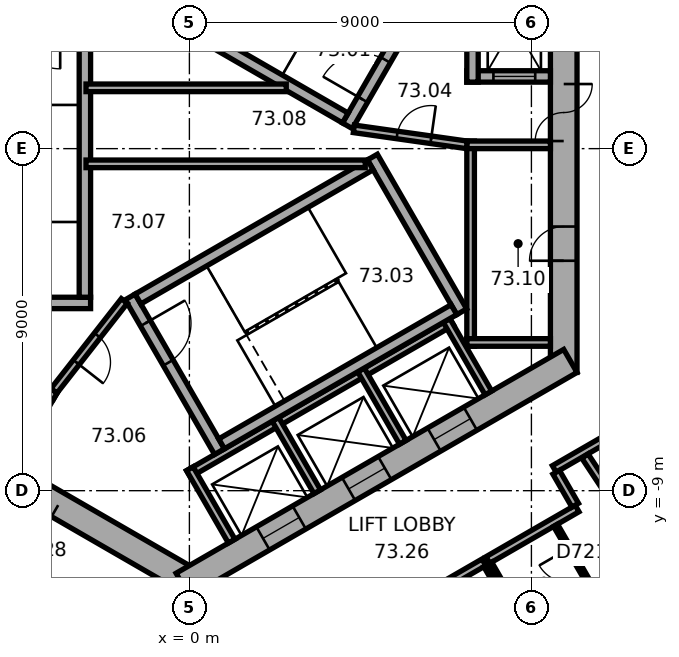
"""IFC4 building model, lengths in metres.
Left out: names, types, materials, properties, quantities, classifications, styles, units other than length and angle.
Written with IfcOpenShell. Run it as: python <this file> out.ifc"""

import sys

from ifc_helpers import new_model, si_unit, direction, frame, frame_2d, origin, place, context, subcontext, project, spatial, rectangle, extrude, element, fill, save


model = new_model("IFC4")
c1 = context("Model", 3, precision=1e-05, world=origin(), true_north=direction((0.0, 1.0)))
c2 = subcontext(c1, "Body", "Model", "MODEL_VIEW")
j1 = project(units=[si_unit("LENGTHUNIT", "METRE"), si_unit("PLANEANGLEUNIT", "RADIAN")], contexts=[c1])
p1 = place(None, origin())
s1 = spatial("IfcSite", under=j1, at=p1, CompositionType="ELEMENT")
p2 = place(p1, origin())
s2 = spatial("IfcBuilding", under=s1, at=p2, CompositionType="ELEMENT")
p3 = place(p2, frame((0.0, 0.0, 296.8)))
s3 = spatial("IfcBuildingStorey", under=s2, at=p3, CompositionType="ELEMENT", Elevation=296.8)
p4 = place(p3, frame((9.85, -5.889, 0.0), z_axis=(0.0, 0.0, 1.0), x_axis=(0.0, 1.0, 0.0)))
e1 = element("IfcWall", 1, at=p4, inside=s3, PredefinedType="SHEAR", context=c2, shape_type="SweptSolid", body=[
    extrude(rectangle(XDim=11.778, YDim=0.7, at=frame_2d((5.889, 0.0))), origin(), (0.0, 0.0, 1.0), 3.7),
])
p5 = place(p4, frame((6.089, 0.0, 0.0)))
e2 = element("IfcOpeningElement", 2, at=p5, cuts=e1, PredefinedType="OPENING", context=c2, shape_type="SweptSolid", body=[
    extrude(rectangle(XDim=1.5, YDim=2.1, at=frame_2d((0.75, 1.05))), frame((0.0, 0.36, 0.0), z_axis=(0.0, -1.0, 0.0), x_axis=(1.0, 0.0, 0.0)), (0.0, 0.0, 1.0), 0.72),
])
p6 = place(p4, frame((2.939, 0.0, 0.0)))
e3 = element("IfcOpeningElement", 3, at=p6, cuts=e1, PredefinedType="OPENING", context=c2, shape_type="SweptSolid", body=[
    extrude(rectangle(XDim=0.9, YDim=2.1, at=frame_2d((0.45, 1.05))), frame((0.0, 0.36, 0.0), z_axis=(0.0, -1.0, 0.0), x_axis=(1.0, 0.0, 0.0)), (0.0, 0.0, 1.0), 0.72),
])
p7 = place(p3, frame((-10.025, -5.586, 0.0), z_axis=(0.0, 0.0, 1.0), x_axis=(0.866026453023, -0.499998182661, 0.0)))
e4 = element("IfcWall", 4, at=p7, inside=s3, PredefinedType="SHEAR", context=c2, shape_type="SweptSolid", body=[
    extrude(rectangle(XDim=11.778, YDim=0.7, at=frame_2d((5.889, 0.0))), origin(), (0.0, 0.0, 1.0), 3.7),
])
p8 = place(p7, frame((6.089, 0.0, 0.0)))
e5 = element("IfcOpeningElement", 5, at=p8, cuts=e4, PredefinedType="OPENING", context=c2, shape_type="SweptSolid", body=[
    extrude(rectangle(XDim=1.5, YDim=2.1, at=frame_2d((0.75, 1.05))), frame((0.0, 0.36, 0.0), z_axis=(0.0, -1.0, 0.0), x_axis=(1.0, 0.0, 0.0)), (0.0, 0.0, 1.0), 0.72),
])
p9 = place(p7, frame((1.539, 0.0, 0.0)))
e6 = element("IfcOpeningElement", 6, at=p9, cuts=e4, PredefinedType="OPENING", context=c2, shape_type="SweptSolid", body=[
    extrude(rectangle(XDim=1.1, YDim=2.1, at=frame_2d((0.55, 1.05))), frame((0.0, 0.36, 0.0), z_axis=(0.0, -1.0, 0.0), x_axis=(1.0, 0.0, 0.0)), (0.0, 0.0, 1.0), 0.72),
])
p10 = place(p7, frame((4.139, 0.0, 0.0)))
e7 = element("IfcOpeningElement", 7, at=p10, cuts=e4, PredefinedType="OPENING", context=c2, shape_type="SweptSolid", body=[
    extrude(rectangle(XDim=1.1, YDim=2.1, at=frame_2d((0.55, 1.05))), frame((0.0, 0.36, 0.0), z_axis=(0.0, -1.0, 0.0), x_axis=(1.0, 0.0, 0.0)), (0.0, 0.0, 1.0), 0.72),
])
p11 = place(p3, frame((-0.175, -11.475, 0.0), z_axis=(0.0, 0.0, 1.0), x_axis=(0.866026453023, 0.499998182661, 0.0)))
e8 = element("IfcWall", 8, at=p11, inside=s3, PredefinedType="SHEAR", context=c2, shape_type="SweptSolid", body=[
    extrude(rectangle(XDim=11.778, YDim=0.7, at=frame_2d((5.889, 0.0))), origin(), (0.0, 0.0, 1.0), 3.7),
])
p12 = place(p11, frame((2.439, 0.0, 0.0)))
e9 = element("IfcOpeningElement", 9, at=p12, cuts=e8, PredefinedType="OPENING", context=c2, shape_type="SweptSolid", body=[
    extrude(rectangle(XDim=1.1, YDim=2.1, at=frame_2d((0.55, 1.05))), frame((0.0, 0.36, 0.0), z_axis=(0.0, -1.0, 0.0), x_axis=(1.0, 0.0, 0.0)), (0.0, 0.0, 1.0), 0.72),
])
p13 = place(p11, frame((5.039, 0.0, 0.0)))
e10 = element("IfcOpeningElement", 10, at=p13, cuts=e8, PredefinedType="OPENING", context=c2, shape_type="SweptSolid", body=[
    extrude(rectangle(XDim=1.1, YDim=2.1, at=frame_2d((0.55, 1.05))), frame((0.0, 0.36, 0.0), z_axis=(0.0, -1.0, 0.0), x_axis=(1.0, 0.0, 0.0)), (0.0, 0.0, 1.0), 0.72),
])
p14 = place(p11, frame((7.639, 0.0, 0.0)))
e11 = element("IfcOpeningElement", 11, at=p14, cuts=e8, PredefinedType="OPENING", context=c2, shape_type="SweptSolid", body=[
    extrude(rectangle(XDim=1.1, YDim=2.1, at=frame_2d((0.55, 1.05))), frame((0.0, 0.36, 0.0), z_axis=(0.0, -1.0, 0.0), x_axis=(1.0, 0.0, 0.0)), (0.0, 0.0, 1.0), 0.72),
])
p15 = place(p3, frame((7.4, -5.2, 0.0), z_axis=(0.0, 0.0, 1.0), x_axis=(0.0, 1.0, 0.0)))
e12 = element("IfcWall", 12, at=p15, inside=s3, PredefinedType="PARTITIONING", context=c2, shape_type="SweptSolid", body=[
    extrude(rectangle(XDim=5.4, YDim=0.2, at=frame_2d((2.7, 0.0))), origin(), (0.0, 0.0, 1.0), 3.35),
])
for number, where, z_axis, x_axis in (
    (13, (7.3, -5.1, 0.0), (0.0, 0.0, 1.0), (1.0, 0.0, 0.0)),
    (14, (7.3, 0.1, 0.0), (0.0, 0.0, 1.0), (1.0, 0.0, 0.0)),
):
    element("IfcWall", number, at=place(p3, frame(where, z_axis=z_axis, x_axis=x_axis)), inside=s3, PredefinedType="PARTITIONING", context=c2, shape_type="SweptSolid", body=[
        extrude(rectangle(XDim=2.2, YDim=0.2, at=frame_2d((1.1, 0.0))), origin(), (0.0, 0.0, 1.0), 3.35),
    ])
p16 = place(p3, frame((-8.203, -3.809, 0.0), z_axis=(0.0, 0.0, 1.0), x_axis=(0.866028230842, -0.499995103361, 0.0)))
e15 = element("IfcWall", 15, at=p16, inside=s3, PredefinedType="PARTITIONING", context=c2, shape_type="SweptSolid", body=[
    extrude(rectangle(XDim=5.4, YDim=0.2, at=frame_2d((2.7, 0.0))), origin(), (0.0, 0.0, 1.0), 3.35),
])
p17 = place(p3, frame((-3.563, -6.372, 0.0), z_axis=(0.0, 0.0, 1.0), x_axis=(-0.499994660107, -0.866028486751, 0.0)))
e16 = element("IfcWall", 16, at=p17, inside=s3, PredefinedType="PARTITIONING", context=c2, shape_type="SweptSolid", body=[
    extrude(rectangle(XDim=2.2, YDim=0.2, at=frame_2d((1.1, 0.0))), origin(), (0.0, 0.0, 1.0), 3.35),
])
p18 = place(p3, frame((-0.024, -8.559, 0.0), z_axis=(0.0, 0.0, 1.0), x_axis=(0.866026010844, 0.49999894854, 0.0)))
e17 = element("IfcWall", 17, at=p18, inside=s3, PredefinedType="PARTITIONING", context=c2, shape_type="SweptSolid", body=[
    extrude(rectangle(XDim=8.0, YDim=0.2, at=frame_2d((4.0, 0.0))), origin(), (0.0, 0.0, 1.0), 3.35),
])
for number, where, z_axis, x_axis in (
    (18, (0.013, -8.422, 0.0), (0.0, 0.0, 1.0), (0.5, -0.866, 0.0)),
    (19, (2.264, -7.122, 0.0), (0.0, 0.0, 1.0), (0.5, -0.866, 0.0)),
    (20, (4.516, -5.822, 0.0), (0.0, 0.0, 1.0), (0.5, -0.866, 0.0)),
    (21, (6.768, -4.522, 0.0), (0.0, 0.0, 1.0), (0.5, -0.866, 0.0)),
):
    element("IfcWall", number, at=place(p3, frame(where, z_axis=z_axis, x_axis=x_axis)), inside=s3, PredefinedType="PARTITIONING", context=c2, shape_type="SweptSolid", body=[
        extrude(rectangle(XDim=2.2, YDim=0.2, at=frame_2d((1.1, 0.0))), origin(), (0.0, 0.0, 1.0), 3.35),
    ])
p19 = place(p3, frame((4.158, 0.602, 0.0), z_axis=(0.0, 0.0, 1.0), x_axis=(0.499977259774, 0.866038532462, 0.0)))
e22 = element("IfcWall", 22, at=p19, inside=s3, PredefinedType="SHEAR", context=c2, shape_type="SweptSolid", body=[
    extrude(rectangle(XDim=4.7, YDim=0.3, at=frame_2d((2.35, 0.0))), origin(), (0.0, 0.0, 1.0), 3.35),
])
p20 = place(p19, frame((0.8, 0.0, 0.0)))
e23 = element("IfcOpeningElement", 23, at=p20, cuts=e22, PredefinedType="OPENING", context=c2, shape_type="SweptSolid", body=[
    extrude(rectangle(XDim=1.2, YDim=2.1, at=frame_2d((0.6, 1.05))), frame((0.0, 0.16, 0.0), z_axis=(0.0, -1.0, 0.0), x_axis=(1.0, 0.0, 0.0)), (0.0, 0.0, 1.0), 0.32),
])
p21 = place(p3, frame((4.103, 0.807, 0.0), z_axis=(0.0, 0.0, 1.0), x_axis=(-0.866027801685, 0.499995846692, 0.0)))
e24 = element("IfcWall", 24, at=p21, inside=s3, PredefinedType="SHEAR", context=c2, shape_type="SweptSolid", body=[
    extrude(rectangle(XDim=7.06, YDim=0.3, at=frame_2d((3.53, 0.0))), origin(), (0.0, 0.0, 1.0), 3.35),
])
p22 = place(p3, frame((-2.6, -4.06, 0.0), z_axis=(0.0, 0.0, 1.0), x_axis=(-1.0, 0.0, 0.0)))
e25 = element("IfcWall", 25, at=p22, inside=s3, PredefinedType="SHEAR", context=c2, shape_type="SweptSolid", body=[
    extrude(rectangle(XDim=4.7, YDim=0.3, at=frame_2d((2.35, 0.0))), origin(), (0.0, 0.0, 1.0), 3.35),
])
p23 = place(p3, frame((-2.75, 3.15, 0.0), z_axis=(0.0, 0.0, 1.0), x_axis=(0.0, -1.0, 0.0)))
e26 = element("IfcWall", 26, at=p23, inside=s3, PredefinedType="SHEAR", context=c2, shape_type="SweptSolid", body=[
    extrude(rectangle(XDim=7.06, YDim=0.3, at=frame_2d((3.53, 0.0))), origin(), (0.0, 0.0, 1.0), 3.35),
])
p24 = place(p3, frame((-1.558, -3.902, 0.0), z_axis=(0.0, 0.0, 1.0), x_axis=(0.499977259774, -0.866038532462, 0.0)))
e27 = element("IfcWall", 27, at=p24, inside=s3, PredefinedType="SHEAR", context=c2, shape_type="SweptSolid", body=[
    extrude(rectangle(XDim=4.7, YDim=0.3, at=frame_2d((2.35, 0.0))), origin(), (0.0, 0.0, 1.0), 3.35),
])
p25 = place(p24, frame((0.8, 0.0, 0.0)))
e28 = element("IfcOpeningElement", 28, at=p25, cuts=e27, PredefinedType="OPENING", context=c2, shape_type="SweptSolid", body=[
    extrude(rectangle(XDim=1.2, YDim=2.1, at=frame_2d((0.6, 1.05))), frame((0.0, 0.16, 0.0), z_axis=(0.0, -1.0, 0.0), x_axis=(1.0, 0.0, 0.0)), (0.0, 0.0, 1.0), 0.32),
])
p26 = place(p3, frame((4.816, -0.222, 0.0), z_axis=(0.0, 0.0, 1.0), x_axis=(0.499977259774, -0.866038532462, 0.0)))
e29 = element("IfcWall", 29, at=p26, inside=s3, PredefinedType="SHEAR", context=c2, shape_type="SweptSolid", body=[
    extrude(rectangle(XDim=4.7, YDim=0.3, at=frame_2d((2.35, 0.0))), origin(), (0.0, 0.0, 1.0), 3.35),
])
for number, where, z_axis, x_axis in (
    (30, (-1.353, -3.957, 0.0), (0.0, 0.0, 1.0), (0.866, 0.5, 0.0)),
    (31, (0.847, -7.767, 0.0), (0.0, 0.0, 1.0), (0.866, 0.5, 0.0)),
):
    element("IfcWall", number, at=place(p3, frame(where, z_axis=z_axis, x_axis=x_axis)), inside=s3, PredefinedType="SHEAR", context=c2, shape_type="SweptSolid", body=[
        extrude(rectangle(XDim=7.06, YDim=0.3, at=frame_2d((3.53, 0.0))), origin(), (0.0, 0.0, 1.0), 3.35),
    ])
p27 = place(p3, frame((7.3, 1.9, 0.0), z_axis=(0.0, 0.0, 1.0), x_axis=(1.0, 0.0, 0.0)))
e32 = element("IfcWall", 32, at=p27, inside=s3, PredefinedType="SHEAR", context=c2, shape_type="SweptSolid", body=[
    extrude(rectangle(XDim=2.2, YDim=0.3, at=frame_2d((1.1, 0.0))), origin(), (0.0, 0.0, 1.0), 3.35),
])
p28 = place(p27, frame((0.7, 0.0, 0.0)))
e33 = element("IfcOpeningElement", 33, at=p28, cuts=e32, PredefinedType="OPENING", context=c2, shape_type="SweptSolid", body=[
    extrude(rectangle(XDim=1.1, YDim=2.1, at=frame_2d((0.55, 1.05))), frame((0.0, 0.16, 0.0), z_axis=(0.0, -1.0, 0.0), x_axis=(1.0, 0.0, 0.0)), (0.0, 0.0, 1.0), 0.32),
])
p29 = place(p3, frame((7.45, 1.75, 0.0), z_axis=(0.0, 0.0, 1.0), x_axis=(0.0, 1.0, 0.0)))
e34 = element("IfcWall", 34, at=p29, inside=s3, PredefinedType="SHEAR", context=c2, shape_type="SweptSolid", body=[
    extrude(rectangle(XDim=3.35, YDim=0.3, at=frame_2d((1.675, 0.0))), origin(), (0.0, 0.0, 1.0), 3.35),
])
p30 = place(p3, frame((4.327, 0.521, 0.0), z_axis=(0.0, 0.0, 1.0), x_axis=(0.990124376366, -0.14019172346, 0.0)))
e35 = element("IfcWall", 35, at=p30, inside=s3, PredefinedType="PARTITIONING", context=c2, shape_type="SweptSolid", body=[
    extrude(rectangle(XDim=3.002, YDim=0.2, at=frame_2d((1.501, 0.0))), origin(), (0.0, 0.0, 1.0), 3.35),
])
p31 = place(p30, frame((1.15, 0.0, 0.0)))
e36 = element("IfcOpeningElement", 36, at=p31, cuts=e35, PredefinedType="OPENING", context=c2, shape_type="SweptSolid", body=[
    extrude(rectangle(XDim=0.9, YDim=2.1, at=frame_2d((0.45, 1.05))), frame((0.0, 0.11, 0.0), z_axis=(0.0, -1.0, 0.0), x_axis=(1.0, 0.0, 0.0)), (0.0, 0.0, 1.0), 0.22),
])
p32 = place(p3, frame((-1.712, -4.008, 0.0), z_axis=(0.0, 0.0, 1.0), x_axis=(-0.616549420702, -0.787316208287, 0.0)))
e37 = element("IfcWall", 37, at=p32, inside=s3, PredefinedType="PARTITIONING", context=c2, shape_type="SweptSolid", body=[
    extrude(rectangle(XDim=3.002, YDim=0.2, at=frame_2d((1.501, 0.0))), origin(), (0.0, 0.0, 1.0), 3.35),
])
p33 = place(p32, frame((1.15, 0.0, 0.0)))
e38 = element("IfcOpeningElement", 38, at=p33, cuts=e37, PredefinedType="OPENING", context=c2, shape_type="SweptSolid", body=[
    extrude(rectangle(XDim=0.9, YDim=2.1, at=frame_2d((0.45, 1.05))), frame((0.0, 0.11, 0.0), z_axis=(0.0, -1.0, 0.0), x_axis=(1.0, 0.0, 0.0)), (0.0, 0.0, 1.0), 0.22),
])
p34 = place(p3, frame((-2.72, -0.4, 0.0), z_axis=(0.0, 0.0, 1.0), x_axis=(1.0, 0.0, 0.0)))
e39 = element("IfcWall", 39, at=p34, inside=s3, PredefinedType="PARTITIONING", context=c2, shape_type="SweptSolid", body=[
    extrude(rectangle(XDim=7.347, YDim=0.2, at=frame_2d((3.674, 0.0))), origin(), (0.0, 0.0, 1.0), 3.35),
])
p35 = place(p3, frame((-2.72, 1.6, 0.0), z_axis=(0.0, 0.0, 1.0), x_axis=(1.0, 0.0, 0.0)))
e40 = element("IfcWall", 40, at=p35, inside=s3, PredefinedType="PARTITIONING", context=c2, shape_type="SweptSolid", body=[
    extrude(rectangle(XDim=5.269, YDim=0.2, at=frame_2d((2.634, 0.0))), origin(), (0.0, 0.0, 1.0), 3.35),
])
p36 = place(p3, frame((4.805, -12.584, 0.0), z_axis=(0.0, 0.0, 1.0), x_axis=(0.866038511948, 0.499977295307, 0.0)))
e41 = element("IfcWall", 41, at=p36, inside=s3, PredefinedType="PARTITIONING", context=c2, shape_type="SweptSolid", body=[
    extrude(rectangle(XDim=3.4, YDim=0.2, at=frame_2d((1.7, 0.0))), origin(), (0.0, 0.0, 1.0), 3.35),
])
p37 = place(p3, frame((7.8, -10.971, 0.0), z_axis=(0.0, 0.0, 1.0), x_axis=(0.500010275428, -0.866019471182, 0.0)))
e42 = element("IfcWall", 42, at=p37, inside=s3, PredefinedType="PARTITIONING", context=c2, shape_type="SweptSolid", body=[
    extrude(rectangle(XDim=3.5, YDim=0.12, at=frame_2d((1.75, 0.0))), origin(), (0.0, 0.0, 1.0), 3.35),
])
p38 = place(p3, frame((7.854, -10.824, 0.0), z_axis=(0.0, 0.0, 1.0), x_axis=(0.866029675718, 0.499992600721, 0.0)))
e43 = element("IfcWall", 43, at=p38, inside=s3, PredefinedType="PARTITIONING", context=c2, shape_type="SweptSolid", body=[
    extrude(rectangle(XDim=2.712, YDim=0.2, at=frame_2d((1.356, 0.0))), origin(), (0.0, 0.0, 1.0), 3.35),
])
p39 = place(p3, frame((9.053, -12.903, 0.0), z_axis=(0.0, 0.0, 1.0), x_axis=(-0.500031774688, 0.866007057882, 0.0)))
e44 = element("IfcWall", 44, at=p39, inside=s3, PredefinedType="PARTITIONING", context=c2, shape_type="SweptSolid", body=[
    extrude(rectangle(XDim=2.3, YDim=0.12, at=frame_2d((1.15, 0.0))), origin(), (0.0, 0.0, 1.0), 3.35),
])
p40 = place(p3, frame((9.602, -8.428, 0.0), z_axis=(0.0, 0.0, 1.0), x_axis=(0.865999114786, 0.500045531117, 0.0)))
e45 = element("IfcWall", 45, at=p40, inside=s3, PredefinedType="PARTITIONING", context=c2, shape_type="SweptSolid", body=[
    extrude(rectangle(XDim=1.788, YDim=0.2, at=frame_2d((0.894, 0.0))), origin(), (0.0, 0.0, 1.0), 3.35),
])
p41 = place(p3, frame((9.635, -9.911, 0.0), z_axis=(0.0, 0.0, 1.0), x_axis=(0.499952165731, -0.866053019151, 0.0)))
e46 = element("IfcWall", 46, at=p41, inside=s3, PredefinedType="PARTITIONING", context=c2, shape_type="SweptSolid", body=[
    extrude(rectangle(XDim=2.3, YDim=0.12, at=frame_2d((1.15, 0.0))), origin(), (0.0, 0.0, 1.0), 3.35),
])
p42 = place(p41, frame((0.7, 0.0, 0.0)))
e47 = element("IfcOpeningElement", 47, at=p42, cuts=e46, PredefinedType="OPENING", context=c2, shape_type="SweptSolid", body=[
    extrude(rectangle(XDim=0.9, YDim=2.1, at=frame_2d((0.45, 1.05))), frame((0.0, 0.07, 0.0), z_axis=(0.0, -1.0, 0.0), x_axis=(1.0, 0.0, 0.0)), (0.0, 0.0, 1.0), 0.14),
])
p43 = place(p3, frame((10.152, -9.382, 0.0), z_axis=(0.0, 0.0, 1.0), x_axis=(-0.499968756647, 0.866043441391, 0.0)))
e48 = element("IfcWall", 48, at=p43, inside=s3, PredefinedType="PARTITIONING", context=c2, shape_type="SweptSolid", body=[
    extrude(rectangle(XDim=1.001, YDim=0.2, at=frame_2d((0.5, 0.0))), origin(), (0.0, 0.0, 1.0), 3.35),
])
p44 = place(p3, frame((13.698, -13.059, 0.0), z_axis=(0.0, 0.0, 1.0), x_axis=(-0.551927229301, 0.833892279348, 0.0)))
e49 = element("IfcWall", 49, at=p44, inside=s3, PredefinedType="PARTITIONING", context=c2, shape_type="SweptSolid", body=[
    extrude(rectangle(XDim=5.96, YDim=0.2, at=frame_2d((2.98, 0.0))), origin(), (0.0, 0.0, 1.0), 2.65),
])
p45 = place(p5, origin())
e50 = element("IfcDoor", 50, at=p45, inside=s3, OperationType="DOUBLE_DOOR_SINGLE_SWING", PredefinedType="DOOR", context=c2, shape_type="SweptSolid", body=[
    extrude(rectangle(XDim=1.5, YDim=2.1, at=frame_2d((0.75, 1.05))), frame((0.0, 0.025, 0.0), z_axis=(0.0, -1.0, 0.0), x_axis=(1.0, 0.0, 0.0)), (0.0, 0.0, 1.0), 0.05),
])
fill(e2, e50)
p46 = place(p8, origin())
e51 = element("IfcDoor", 51, at=p46, inside=s3, OperationType="DOUBLE_DOOR_SINGLE_SWING", PredefinedType="DOOR", context=c2, shape_type="SweptSolid", body=[
    extrude(rectangle(XDim=1.5, YDim=2.1, at=frame_2d((0.75, 1.05))), frame((0.0, 0.025, 0.0), z_axis=(0.0, -1.0, 0.0), x_axis=(1.0, 0.0, 0.0)), (0.0, 0.0, 1.0), 0.05),
])
fill(e5, e51)
p47 = place(p20, origin())
e52 = element("IfcDoor", 52, at=p47, inside=s3, OperationType="SINGLE_SWING_RIGHT", PredefinedType="DOOR", context=c2, shape_type="SweptSolid", body=[
    extrude(rectangle(XDim=1.2, YDim=2.1, at=frame_2d((0.6, 1.05))), frame((0.0, 0.025, 0.0), z_axis=(0.0, -1.0, 0.0), x_axis=(1.0, 0.0, 0.0)), (0.0, 0.0, 1.0), 0.05),
])
fill(e23, e52)
p48 = place(p25, origin())
e53 = element("IfcDoor", 53, at=p48, inside=s3, OperationType="SINGLE_SWING_RIGHT", PredefinedType="DOOR", context=c2, shape_type="SweptSolid", body=[
    extrude(rectangle(XDim=1.2, YDim=2.1, at=frame_2d((0.6, 1.05))), frame((0.0, 0.025, 0.0), z_axis=(0.0, -1.0, 0.0), x_axis=(1.0, 0.0, 0.0)), (0.0, 0.0, 1.0), 0.05),
])
fill(e28, e53)
p49 = place(p31, origin())
e54 = element("IfcDoor", 54, at=p49, inside=s3, OperationType="SINGLE_SWING_LEFT", PredefinedType="DOOR", context=c2, shape_type="SweptSolid", body=[
    extrude(rectangle(XDim=0.9, YDim=2.1, at=frame_2d((0.45, 1.05))), frame((0.0, 0.025, 0.0), z_axis=(0.0, -1.0, 0.0), x_axis=(1.0, 0.0, 0.0)), (0.0, 0.0, 1.0), 0.05),
])
fill(e36, e54)
p50 = place(p33, origin())
e55 = element("IfcDoor", 55, at=p50, inside=s3, OperationType="SINGLE_SWING_LEFT", PredefinedType="DOOR", context=c2, shape_type="SweptSolid", body=[
    extrude(rectangle(XDim=0.9, YDim=2.1, at=frame_2d((0.45, 1.05))), frame((0.0, 0.025, 0.0), z_axis=(0.0, -1.0, 0.0), x_axis=(1.0, 0.0, 0.0)), (0.0, 0.0, 1.0), 0.05),
])
fill(e38, e55)
p51 = place(p6, origin())
e56 = element("IfcDoor", 56, at=p51, inside=s3, OperationType="SINGLE_SWING_LEFT", PredefinedType="DOOR", context=c2, shape_type="SweptSolid", body=[
    extrude(rectangle(XDim=0.9, YDim=2.1, at=frame_2d((0.45, 1.05))), frame((0.0, 0.025, 0.0), z_axis=(0.0, -1.0, 0.0), x_axis=(1.0, 0.0, 0.0)), (0.0, 0.0, 1.0), 0.05),
])
fill(e3, e56)
p52 = place(p28, origin())
e57 = element("IfcDoor", 57, at=p52, inside=s3, OperationType="DOUBLE_DOOR_SLIDING", PredefinedType="DOOR", context=c2, shape_type="SweptSolid", body=[
    extrude(rectangle(XDim=1.1, YDim=2.1, at=frame_2d((0.55, 1.05))), frame((0.0, 0.025, 0.0), z_axis=(0.0, -1.0, 0.0), x_axis=(1.0, 0.0, 0.0)), (0.0, 0.0, 1.0), 0.05),
])
fill(e33, e57)
p53 = place(p12, origin())
e58 = element("IfcDoor", 58, at=p53, inside=s3, OperationType="DOUBLE_DOOR_SLIDING", PredefinedType="DOOR", context=c2, shape_type="SweptSolid", body=[
    extrude(rectangle(XDim=1.1, YDim=2.1, at=frame_2d((0.55, 1.05))), frame((0.0, 0.025, 0.0), z_axis=(0.0, -1.0, 0.0), x_axis=(1.0, 0.0, 0.0)), (0.0, 0.0, 1.0), 0.05),
])
fill(e9, e58)
p54 = place(p13, origin())
e59 = element("IfcDoor", 59, at=p54, inside=s3, OperationType="DOUBLE_DOOR_SLIDING", PredefinedType="DOOR", context=c2, shape_type="SweptSolid", body=[
    extrude(rectangle(XDim=1.1, YDim=2.1, at=frame_2d((0.55, 1.05))), frame((0.0, 0.025, 0.0), z_axis=(0.0, -1.0, 0.0), x_axis=(1.0, 0.0, 0.0)), (0.0, 0.0, 1.0), 0.05),
])
fill(e10, e59)
p55 = place(p14, origin())
e60 = element("IfcDoor", 60, at=p55, inside=s3, OperationType="DOUBLE_DOOR_SLIDING", PredefinedType="DOOR", context=c2, shape_type="SweptSolid", body=[
    extrude(rectangle(XDim=1.1, YDim=2.1, at=frame_2d((0.55, 1.05))), frame((0.0, 0.025, 0.0), z_axis=(0.0, -1.0, 0.0), x_axis=(1.0, 0.0, 0.0)), (0.0, 0.0, 1.0), 0.05),
])
fill(e11, e60)
p56 = place(p42, origin())
e61 = element("IfcDoor", 61, at=p56, inside=s3, OperationType="SINGLE_SWING_LEFT", PredefinedType="DOOR", context=c2, shape_type="SweptSolid", body=[
    extrude(rectangle(XDim=0.9, YDim=2.1, at=frame_2d((0.45, 1.05))), frame((0.0, 0.025, 0.0), z_axis=(0.0, -1.0, 0.0), x_axis=(1.0, 0.0, 0.0)), (0.0, 0.0, 1.0), 0.05),
])
fill(e47, e61)
save(model, sys.argv[1])
